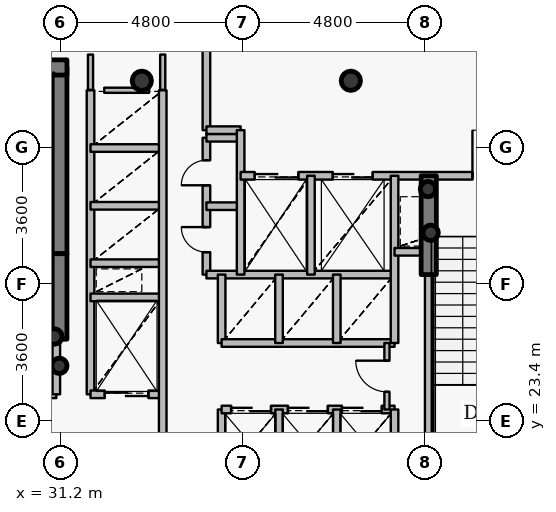
"""IFC4 building model, lengths in metres.
Left out: names, types, materials, properties, quantities, classifications, styles, units other than length and angle.
Written with IfcOpenShell. Run it as: python <this file> out.ifc"""

import sys

from ifc_helpers import new_model, si_unit, direction, frame, frame_2d, origin, origin_2d, place, context, subcontext, project, spatial, rectangle, hollow_circle, extrude, source, transform, mapped, element, fill, save


model = new_model("IFC4")
c1 = context("Model", 3, precision=1e-05, world=origin(), true_north=direction((0.0, 1.0)))
c2 = subcontext(c1, "Body", "Model", "MODEL_VIEW")
j1 = project(units=[si_unit("LENGTHUNIT", "METRE"), si_unit("PLANEANGLEUNIT", "RADIAN")], contexts=[c1])
p1 = place(None, origin())
s1 = spatial("IfcSite", under=j1, at=p1, CompositionType="ELEMENT")
p2 = place(p1, origin())
s2 = spatial("IfcBuilding", under=s1, at=p2, CompositionType="ELEMENT")
p3 = place(p2, frame((0.0, 0.0, 53.4)))
s3 = spatial("IfcBuildingStorey", under=s2, at=p3, CompositionType="ELEMENT", Elevation=53.4)
for number, where, z_axis, x_axis in (
    (1, (38.85, 32.35, 0.0), (0.0, 0.0, 1.0), (1.0, 0.0, 0.0)),
    (2, (33.35, 32.35, 0.0), (0.0, 0.0, 1.0), (1.0, 0.0, 0.0)),
):
    element("IfcColumn", number, at=place(p3, frame(where, z_axis=z_axis, x_axis=x_axis)), inside=s3, PredefinedType="COLUMN", context=c2, shape_type="SweptSolid", body=[
        extrude(hollow_circle(Radius=0.254, WallThickness=0.02, at=origin_2d()), origin(), (0.0, 0.0, 1.0), 4.2),
    ])
p4 = place(p3, frame((31.18, 27.8, 0.0), z_axis=(0.0, 0.0, 1.0), x_axis=(0.0, 1.0, 0.0)))
e3 = element("IfcWall", 3, at=p4, inside=s3, PredefinedType="SHEAR", context=c2, shape_type="SweptSolid", body=[
    extrude(rectangle(XDim=4.9, YDim=0.4, at=frame_2d((2.45, 0.0))), origin(), (0.0, 0.0, 1.0), 4.2),
])
p5 = place(p3, frame((27.28, 32.7, 0.0), z_axis=(0.0, 0.0, 1.0), x_axis=(1.0, 0.0, 0.0)))
e4 = element("IfcWall", 4, at=p5, inside=s3, PredefinedType="SHEAR", context=c2, shape_type="SweptSolid", body=[
    extrude(rectangle(XDim=4.1, YDim=0.4, at=frame_2d((2.05, 0.0))), origin(), (0.0, 0.0, 1.0), 4.2),
])
for number, where, z_axis, x_axis in (
    (5, (31.05, 25.62, 0.0), (0.0, 0.0, 1.0), (1.0, 0.0, 0.0)),
    (6, (31.18, 24.85, 0.0), (0.0, 0.0, 1.0), (1.0, 0.0, 0.0)),
    (7, (40.95, 28.35, 0.0), (0.0, 0.0, 1.0), (1.0, 0.0, 0.0)),
    (8, (40.88, 29.5, 0.0), (0.0, 0.0, 1.0), (1.0, 0.0, 0.0)),
):
    element("IfcColumn", number, at=place(p3, frame(where, z_axis=z_axis, x_axis=x_axis)), inside=s3, PredefinedType="COLUMN", context=c2, shape_type="SweptSolid", body=[
        extrude(hollow_circle(Radius=0.203, WallThickness=0.016, at=origin_2d()), origin(), (0.0, 0.0, 1.0), 4.2),
    ])
p6 = place(p3, frame((31.18, 25.55, 0.0), z_axis=(0.0, 0.0, 1.0), x_axis=(0.0, 1.0, 0.0)))
e9 = element("IfcWall", 9, at=p6, inside=s3, PredefinedType="SHEAR", context=c2, shape_type="SweptSolid", body=[
    extrude(rectangle(XDim=2.25, YDim=0.4, at=frame_2d((1.125, 0.0))), origin(), (0.0, 0.0, 1.0), 3.55),
])
p7 = place(p3, frame((40.9, 27.25, 0.0), z_axis=(0.0, 0.0, 1.0), x_axis=(0.0, 1.0, 0.0)))
e10 = element("IfcWall", 10, at=p7, inside=s3, PredefinedType="SHEAR", context=c2, shape_type="SweptSolid", body=[
    extrude(rectangle(XDim=2.6, YDim=0.4, at=frame_2d((1.3, 0.0))), origin(), (0.0, 0.0, 1.0), 3.55),
])
p8 = place(p3, frame((27.56, 24.1, 0.0), z_axis=(0.0, 0.0, 1.0), x_axis=(1.0, 0.0, 0.0)))
e11 = element("IfcWall", 11, at=p8, inside=s3, PredefinedType="PARTITIONING", context=c2, shape_type="SweptSolid", body=[
    extrude(rectangle(XDim=3.54, YDim=0.2, at=frame_2d((1.77, 0.0))), origin(), (0.0, 0.0, 1.0), 3.95),
])
p9 = place(p8, frame((1.17, 0.0, 0.0)))
e12 = element("IfcOpeningElement", 12, at=p9, cuts=e11, PredefinedType="OPENING", context=c2, shape_type="SweptSolid", body=[
    extrude(rectangle(XDim=1.2, YDim=2.15, at=origin_2d()), frame((0.6, 0.11, 1.075), z_axis=(0.0, -1.0, 0.0), x_axis=(1.0, 0.0, 0.0)), (0.0, 0.0, 1.0), 0.22),
])
p10 = place(p3, frame((31.1, 24.1, 0.0), z_axis=(0.0, 0.0, 1.0), x_axis=(0.0, 1.0, 0.0)))
e13 = element("IfcWall", 13, at=p10, inside=s3, PredefinedType="PARTITIONING", context=c2, shape_type="SweptSolid", body=[
    extrude(rectangle(XDim=1.44, YDim=0.2, at=frame_2d((0.72, 0.0))), origin(), (0.0, 0.0, 1.0), 3.95),
])
p11 = place(p3, frame((32.0, 24.1, 0.0), z_axis=(0.0, 0.0, 1.0), x_axis=(0.0, 1.0, 0.0)))
e14 = element("IfcWall", 14, at=p11, inside=s3, PredefinedType="PARTITIONING", context=c2, shape_type="SweptSolid", body=[
    extrude(rectangle(XDim=8.0, YDim=0.2, at=frame_2d((4.0, 0.0))), origin(), (0.0, 0.0, 1.0), 3.95),
])
p12 = place(p3, frame((32.0, 24.1, 0.0), z_axis=(0.0, 0.0, 1.0), x_axis=(1.0, 0.0, 0.0)))
e15 = element("IfcWall", 15, at=p12, inside=s3, PredefinedType="PARTITIONING", context=c2, shape_type="SweptSolid", body=[
    extrude(rectangle(XDim=1.9, YDim=0.2, at=frame_2d((0.95, 0.0))), origin(), (0.0, 0.0, 1.0), 3.535),
])
p13 = place(p12, frame((0.375, 0.0, 0.0)))
e16 = element("IfcOpeningElement", 16, at=p13, cuts=e15, PredefinedType="OPENING", context=c2, shape_type="SweptSolid", body=[
    extrude(rectangle(XDim=1.15, YDim=2.15, at=origin_2d()), frame((0.575, 0.11, 1.075), z_axis=(0.0, -1.0, 0.0), x_axis=(1.0, 0.0, 0.0)), (0.0, 0.0, 1.0), 0.22),
])
for number, where, z_axis, x_axis in (
    (17, (32.0, 26.65, 0.0), (0.0, 0.0, 1.0), (1.0, 0.0, 0.0)),
    (18, (32.0, 27.55, 0.0), (0.0, 0.0, 1.0), (1.0, 0.0, 0.0)),
    (19, (32.0, 29.06, 0.0), (0.0, 0.0, 1.0), (1.0, 0.0, 0.0)),
    (20, (32.0, 30.58, 0.0), (0.0, 0.0, 1.0), (1.0, 0.0, 0.0)),
):
    element("IfcWall", number, at=place(p3, frame(where, z_axis=z_axis, x_axis=x_axis)), inside=s3, PredefinedType="PARTITIONING", context=c2, shape_type="SweptSolid", body=[
        extrude(rectangle(XDim=1.9, YDim=0.2, at=frame_2d((0.95, 0.0))), origin(), (0.0, 0.0, 1.0), 3.535),
    ])
p14 = place(p3, frame((33.9, 20.7, 0.0), z_axis=(0.0, 0.0, 1.0), x_axis=(0.0, 1.0, 0.0)))
e21 = element("IfcWall", 21, at=p14, inside=s3, PredefinedType="PARTITIONING", context=c2, shape_type="SweptSolid", body=[
    extrude(rectangle(XDim=11.4, YDim=0.2, at=frame_2d((5.7, 0.0))), origin(), (0.0, 0.0, 1.0), 3.535),
])
p15 = place(p3, frame((35.05, 27.25, 0.0), z_axis=(0.0, 0.0, 1.0), x_axis=(0.0, 1.0, 0.0)))
e22 = element("IfcWall", 22, at=p15, inside=s3, PredefinedType="PARTITIONING", context=c2, shape_type="SweptSolid", body=[
    extrude(rectangle(XDim=3.6, YDim=0.2, at=frame_2d((1.8, 0.0))), origin(), (0.0, 0.0, 1.0), 3.95),
])
p16 = place(p15, frame((0.59, 0.0, 0.0)))
e23 = element("IfcOpeningElement", 23, at=p16, cuts=e22, PredefinedType="OPENING", context=c2, shape_type="SweptSolid", body=[
    extrude(rectangle(XDim=0.66, YDim=2.05, at=origin_2d()), frame((0.33, 0.11, 1.025), z_axis=(0.0, -1.0, 0.0), x_axis=(1.0, 0.0, 0.0)), (0.0, 0.0, 1.0), 0.22),
])
p17 = place(p15, frame((2.35, 0.0, 0.0)))
e24 = element("IfcOpeningElement", 24, at=p17, cuts=e22, PredefinedType="OPENING", context=c2, shape_type="SweptSolid", body=[
    extrude(rectangle(XDim=0.66, YDim=2.05, at=origin_2d()), frame((0.33, 0.11, 1.025), z_axis=(0.0, -1.0, 0.0), x_axis=(1.0, 0.0, 0.0)), (0.0, 0.0, 1.0), 0.22),
])
p18 = place(p3, frame((35.05, 27.25, 0.0), z_axis=(0.0, 0.0, 1.0), x_axis=(1.0, 0.0, 0.0)))
e25 = element("IfcWall", 25, at=p18, inside=s3, PredefinedType="PARTITIONING", context=c2, shape_type="SweptSolid", body=[
    extrude(rectangle(XDim=4.95, YDim=0.2, at=frame_2d((2.475, 0.0))), origin(), (0.0, 0.0, 1.0), 3.535),
])
for number, where, z_axis, x_axis in (
    (26, (35.05, 29.05, 0.0), (0.0, 0.0, 1.0), (1.0, 0.0, 0.0)),
    (27, (35.05, 30.85, 0.0), (0.0, 0.0, 1.0), (1.0, 0.0, 0.0)),
):
    element("IfcWall", number, at=place(p3, frame(where, z_axis=z_axis, x_axis=x_axis)), inside=s3, PredefinedType="PARTITIONING", context=c2, shape_type="SweptSolid", body=[
        extrude(rectangle(XDim=0.9, YDim=0.2, at=frame_2d((0.45, 0.0))), origin(), (0.0, 0.0, 1.0), 3.95),
    ])
p19 = place(p3, frame((35.05, 31.05, 0.0), z_axis=(0.0, 0.0, 1.0), x_axis=(0.0, 1.0, 0.0)))
e28 = element("IfcWall", 28, at=p19, inside=s3, PredefinedType="PARTITIONING", context=c2, shape_type="SweptSolid", body=[
    extrude(rectangle(XDim=2.25, YDim=0.2, at=frame_2d((1.125, 0.0))), origin(), (0.0, 0.0, 1.0), 3.535),
])
p20 = place(p3, frame((35.05, 31.05, 0.0), z_axis=(0.0, 0.0, 1.0), x_axis=(1.0, 0.0, 0.0)))
e29 = element("IfcWall", 29, at=p20, inside=s3, PredefinedType="PARTITIONING", context=c2, shape_type="SweptSolid", body=[
    extrude(rectangle(XDim=0.9, YDim=0.2, at=frame_2d((0.45, 0.0))), origin(), (0.0, 0.0, 1.0), 3.95),
])
p21 = place(p3, frame((35.45, 21.9, 0.0), z_axis=(0.0, 0.0, 1.0), x_axis=(0.0, 1.0, 0.0)))
e30 = element("IfcWall", 30, at=p21, inside=s3, PredefinedType="PARTITIONING", context=c2, shape_type="SweptSolid", body=[
    extrude(rectangle(XDim=1.8, YDim=0.2, at=frame_2d((0.9, 0.0))), origin(), (0.0, 0.0, 1.0), 3.95),
])
p22 = place(p3, frame((35.45, 23.7, 0.0), z_axis=(0.0, 0.0, 1.0), x_axis=(1.0, 0.0, 0.0)))
e31 = element("IfcWall", 31, at=p22, inside=s3, PredefinedType="PARTITIONING", context=c2, shape_type="SweptSolid", body=[
    extrude(rectangle(XDim=4.55, YDim=0.2, at=frame_2d((2.275, 0.0))), origin(), (0.0, 0.0, 1.0), 3.535),
])
p23 = place(p22, frame((0.25, 0.0, 0.0)))
e32 = element("IfcOpeningElement", 32, at=p23, cuts=e31, PredefinedType="OPENING", context=c2, shape_type="SweptSolid", body=[
    extrude(rectangle(XDim=1.05, YDim=2.15, at=origin_2d()), frame((0.525, 0.11, 1.075), z_axis=(0.0, -1.0, 0.0), x_axis=(1.0, 0.0, 0.0)), (0.0, 0.0, 1.0), 0.22),
])
p24 = place(p22, frame((1.745, 0.0, 0.0)))
e33 = element("IfcOpeningElement", 33, at=p24, cuts=e31, PredefinedType="OPENING", context=c2, shape_type="SweptSolid", body=[
    extrude(rectangle(XDim=1.05, YDim=2.15, at=origin_2d()), frame((0.525, 0.11, 1.075), z_axis=(0.0, -1.0, 0.0), x_axis=(1.0, 0.0, 0.0)), (0.0, 0.0, 1.0), 0.22),
])
p25 = place(p22, frame((3.165, 0.0, 0.0)))
e34 = element("IfcOpeningElement", 34, at=p25, cuts=e31, PredefinedType="OPENING", context=c2, shape_type="SweptSolid", body=[
    extrude(rectangle(XDim=1.05, YDim=2.15, at=origin_2d()), frame((0.525, 0.11, 1.075), z_axis=(0.0, -1.0, 0.0), x_axis=(1.0, 0.0, 0.0)), (0.0, 0.0, 1.0), 0.22),
])
p26 = place(p3, frame((35.45, 25.45, 0.0), z_axis=(0.0, 0.0, 1.0), x_axis=(0.0, 1.0, 0.0)))
e35 = element("IfcWall", 35, at=p26, inside=s3, PredefinedType="PARTITIONING", context=c2, shape_type="SweptSolid", body=[
    extrude(rectangle(XDim=1.8, YDim=0.2, at=frame_2d((0.9, 0.0))), origin(), (0.0, 0.0, 1.0), 3.95),
])
p27 = place(p3, frame((35.45, 25.45, 0.0), z_axis=(0.0, 0.0, 1.0), x_axis=(1.0, 0.0, 0.0)))
e36 = element("IfcWall", 36, at=p27, inside=s3, PredefinedType="PARTITIONING", context=c2, shape_type="SweptSolid", body=[
    extrude(rectangle(XDim=4.55, YDim=0.2, at=frame_2d((2.275, 0.0))), origin(), (0.0, 0.0, 1.0), 3.535),
])
p28 = place(p3, frame((35.95, 27.25, 0.0), z_axis=(0.0, 0.0, 1.0), x_axis=(0.0, 1.0, 0.0)))
e37 = element("IfcWall", 37, at=p28, inside=s3, PredefinedType="PARTITIONING", context=c2, shape_type="SweptSolid", body=[
    extrude(rectangle(XDim=3.8, YDim=0.2, at=frame_2d((1.9, 0.0))), origin(), (0.0, 0.0, 1.0), 3.95),
])
p29 = place(p3, frame((35.95, 29.85, 0.0), z_axis=(0.0, 0.0, 1.0), x_axis=(1.0, 0.0, 0.0)))
e38 = element("IfcWall", 38, at=p29, inside=s3, PredefinedType="PARTITIONING", context=c2, shape_type="SweptSolid", body=[
    extrude(rectangle(XDim=8.49, YDim=0.2, at=frame_2d((4.245, 0.0))), origin(), (0.0, 0.0, 1.0), 3.535),
])
p30 = place(p29, frame((6.1, 0.0, 0.0)))
e39 = element("IfcOpeningElement", 39, at=p30, cuts=e38, PredefinedType="OPENING", context=c2, shape_type="SweptSolid", body=[
    extrude(rectangle(XDim=1.2, YDim=2.15, at=origin_2d()), frame((0.6, 0.11, 1.075), z_axis=(0.0, -1.0, 0.0), x_axis=(1.0, 0.0, 0.0)), (0.0, 0.0, 1.0), 0.22),
])
p31 = place(p29, frame((0.37, 0.0, 0.0)))
e40 = element("IfcOpeningElement", 40, at=p31, cuts=e38, PredefinedType="OPENING", context=c2, shape_type="SweptSolid", body=[
    extrude(rectangle(XDim=1.15, YDim=2.15, at=origin_2d()), frame((0.575, 0.11, 1.075), z_axis=(0.0, -1.0, 0.0), x_axis=(1.0, 0.0, 0.0)), (0.0, 0.0, 1.0), 0.22),
])
p32 = place(p29, frame((2.425, 0.0, 0.0)))
e41 = element("IfcOpeningElement", 41, at=p32, cuts=e38, PredefinedType="OPENING", context=c2, shape_type="SweptSolid", body=[
    extrude(rectangle(XDim=1.05, YDim=2.15, at=origin_2d()), frame((0.525, 0.11, 1.075), z_axis=(0.0, -1.0, 0.0), x_axis=(1.0, 0.0, 0.0)), (0.0, 0.0, 1.0), 0.22),
])
for number, where, z_axis, x_axis in (
    (42, (36.96, 21.9, 0.0), (0.0, 0.0, 1.0), (0.0, 1.0, 0.0)),
    (43, (36.96, 25.45, 0.0), (0.0, 0.0, 1.0), (0.0, 1.0, 0.0)),
):
    element("IfcWall", number, at=place(p3, frame(where, z_axis=z_axis, x_axis=x_axis)), inside=s3, PredefinedType="PARTITIONING", context=c2, shape_type="SweptSolid", body=[
        extrude(rectangle(XDim=1.8, YDim=0.2, at=frame_2d((0.9, 0.0))), origin(), (0.0, 0.0, 1.0), 3.95),
    ])
p33 = place(p3, frame((37.8, 27.25, 0.0), z_axis=(0.0, 0.0, 1.0), x_axis=(0.0, 1.0, 0.0)))
e44 = element("IfcWall", 44, at=p33, inside=s3, PredefinedType="PARTITIONING", context=c2, shape_type="SweptSolid", body=[
    extrude(rectangle(XDim=2.6, YDim=0.2, at=frame_2d((1.3, 0.0))), origin(), (0.0, 0.0, 1.0), 3.95),
])
for number, where, z_axis, x_axis in (
    (45, (38.48, 21.9, 0.0), (0.0, 0.0, 1.0), (0.0, 1.0, 0.0)),
    (46, (38.48, 25.45, 0.0), (0.0, 0.0, 1.0), (0.0, 1.0, 0.0)),
):
    element("IfcWall", number, at=place(p3, frame(where, z_axis=z_axis, x_axis=x_axis)), inside=s3, PredefinedType="PARTITIONING", context=c2, shape_type="SweptSolid", body=[
        extrude(rectangle(XDim=1.8, YDim=0.2, at=frame_2d((0.9, 0.0))), origin(), (0.0, 0.0, 1.0), 3.95),
    ])
p34 = place(p3, frame((39.8, 23.7, 0.0), z_axis=(0.0, 0.0, 1.0), x_axis=(0.0, 1.0, 0.0)))
e47 = element("IfcWall", 47, at=p34, inside=s3, PredefinedType="PARTITIONING", context=c2, shape_type="SweptSolid", body=[
    extrude(rectangle(XDim=1.75, YDim=0.135, at=frame_2d((0.875, 0.0))), origin(), (0.0, 0.0, 1.0), 3.95),
])
p35 = place(p34, frame((0.465, 0.0, 0.0)))
e48 = element("IfcOpeningElement", 48, at=p35, cuts=e47, PredefinedType="OPENING", context=c2, shape_type="SweptSolid", body=[
    extrude(rectangle(XDim=0.82, YDim=2.1, at=origin_2d()), frame((0.41, 0.078, 1.05), z_axis=(0.0, -1.0, 0.0), x_axis=(1.0, 0.0, 0.0)), (0.0, 0.0, 1.0), 0.155),
])
p36 = place(p3, frame((40.0, 21.9, 0.0), z_axis=(0.0, 0.0, 1.0), x_axis=(0.0, 1.0, 0.0)))
e49 = element("IfcWall", 49, at=p36, inside=s3, PredefinedType="PARTITIONING", context=c2, shape_type="SweptSolid", body=[
    extrude(rectangle(XDim=1.8, YDim=0.2, at=frame_2d((0.9, 0.0))), origin(), (0.0, 0.0, 1.0), 3.95),
])
p37 = place(p3, frame((40.0, 25.45, 0.0), z_axis=(0.0, 0.0, 1.0), x_axis=(0.0, 1.0, 0.0)))
e50 = element("IfcWall", 50, at=p37, inside=s3, PredefinedType="PARTITIONING", context=c2, shape_type="SweptSolid", body=[
    extrude(rectangle(XDim=4.4, YDim=0.2, at=frame_2d((2.2, 0.0))), origin(), (0.0, 0.0, 1.0), 3.95),
])
p38 = place(p3, frame((40.0, 27.85, 0.0), z_axis=(0.0, 0.0, 1.0), x_axis=(1.0, 0.0, 0.0)))
e51 = element("IfcWall", 51, at=p38, inside=s3, PredefinedType="PARTITIONING", context=c2, shape_type="SweptSolid", body=[
    extrude(rectangle(XDim=0.9, YDim=0.2, at=frame_2d((0.45, 0.0))), origin(), (0.0, 0.0, 1.0), 3.95),
])
p39 = place(p3, frame((40.9, 21.33, 0.0), z_axis=(0.0, 0.0, 1.0), x_axis=(0.0, 1.0, 0.0)))
e52 = element("IfcWall", 52, at=p39, inside=s3, PredefinedType="PARTITIONING", context=c2, shape_type="SweptSolid", body=[
    extrude(rectangle(XDim=5.91, YDim=0.2, at=frame_2d((2.955, 0.0))), origin(), (0.0, 0.0, 1.0), 3.485),
])
p40 = place(p3, frame((32.36, 32.1, 0.0), z_axis=(0.0, 0.0, 1.0), x_axis=(1.0, 0.0, 0.0)))
e53 = element("IfcWall", 53, at=p40, inside=s3, PredefinedType="PARTITIONING", context=c2, shape_type="SweptSolid", body=[
    extrude(rectangle(XDim=1.18, YDim=0.135, at=frame_2d((0.59, 0.0))), origin(), (0.0, 0.0, 1.0), 3.535),
])
p41 = place(p3, frame((32.0, 33.04, 0.0), z_axis=(0.0, 0.0, 1.0), x_axis=(0.0, -1.0, 0.0)))
e54 = element("IfcWall", 54, at=p41, inside=s3, PredefinedType="PARTITIONING", context=c2, shape_type="SweptSolid", body=[
    extrude(rectangle(XDim=0.93, YDim=0.135, at=frame_2d((0.465, 0.0))), origin(), (0.0, 0.0, 1.0), 3.485),
])
p42 = place(p3, frame((33.9, 32.11, 0.0), z_axis=(0.0, 0.0, 1.0), x_axis=(0.0, 1.0, 0.0)))
e55 = element("IfcWall", 55, at=p42, inside=s3, PredefinedType="PARTITIONING", context=c2, shape_type="SweptSolid", body=[
    extrude(rectangle(XDim=0.93, YDim=0.135, at=frame_2d((0.465, 0.0))), origin(), (0.0, 0.0, 1.0), 3.535),
])
m1 = source(origin(), c2, "Body", "SweptSolid", [
    extrude(rectangle(XDim=1.2, YDim=2.15, at=origin_2d()), frame((0.6, 0.025, 1.075), z_axis=(0.0, -1.0, 0.0), x_axis=(1.0, 0.0, 0.0)), (0.0, 0.0, 1.0), 0.05),
])
p43 = place(p30, origin())
e56 = element("IfcDoor", 56, at=p43, inside=s3, OperationType="SINGLE_SWING_LEFT", PredefinedType="DOOR", context=c2, shape_type="MappedRepresentation", body=[
    mapped(m1, transform((0.0, 0.0, 0.0), x_axis=(1.0, 0.0, 0.0), y_axis=(0.0, 1.0, 0.0), z_axis=(0.0, 0.0, 1.0), scale=1.0)),
])
fill(e39, e56)
m2 = source(origin(), c2, "Body", "SweptSolid", [
    extrude(rectangle(XDim=1.15, YDim=2.15, at=origin_2d()), frame((0.575, 0.025, 1.075), z_axis=(0.0, -1.0, 0.0), x_axis=(1.0, 0.0, 0.0)), (0.0, 0.0, 1.0), 0.05),
])
p44 = place(p31, origin())
e57 = element("IfcDoor", 57, at=p44, inside=s3, OperationType="DOUBLE_DOOR_SLIDING", PredefinedType="USERDEFINED", context=c2, shape_type="MappedRepresentation", body=[
    mapped(m2, transform((0.0, 0.0, 0.0), x_axis=(1.0, 0.0, 0.0), y_axis=(0.0, 1.0, 0.0), z_axis=(0.0, 0.0, 1.0), scale=1.0)),
])
fill(e40, e57)
p45 = place(p13, origin())
e58 = element("IfcDoor", 58, at=p45, inside=s3, OperationType="DOUBLE_DOOR_SLIDING", PredefinedType="USERDEFINED", context=c2, shape_type="MappedRepresentation", body=[
    mapped(m2, transform((0.0, 0.0, 0.0), x_axis=(1.0, 0.0, 0.0), y_axis=(0.0, 1.0, 0.0), z_axis=(0.0, 0.0, 1.0), scale=1.0)),
])
fill(e16, e58)
m3 = source(origin(), c2, "Body", "SweptSolid", [
    extrude(rectangle(XDim=1.05, YDim=2.15, at=origin_2d()), frame((0.525, 0.025, 1.075), z_axis=(0.0, -1.0, 0.0), x_axis=(1.0, 0.0, 0.0)), (0.0, 0.0, 1.0), 0.05),
])
p46 = place(p32, origin())
e59 = element("IfcDoor", 59, at=p46, inside=s3, OperationType="DOUBLE_DOOR_SLIDING", PredefinedType="USERDEFINED", context=c2, shape_type="MappedRepresentation", body=[
    mapped(m3, transform((0.0, 0.0, 0.0), x_axis=(1.0, 0.0, 0.0), y_axis=(0.0, 1.0, 0.0), z_axis=(0.0, 0.0, 1.0), scale=1.0)),
])
fill(e41, e59)
p47 = place(p23, origin())
e60 = element("IfcDoor", 60, at=p47, inside=s3, OperationType="DOUBLE_DOOR_SLIDING", PredefinedType="USERDEFINED", context=c2, shape_type="MappedRepresentation", body=[
    mapped(m3, transform((0.0, 0.0, 0.0), x_axis=(1.0, 0.0, 0.0), y_axis=(0.0, 1.0, 0.0), z_axis=(0.0, 0.0, 1.0), scale=1.0)),
])
fill(e32, e60)
p48 = place(p24, origin())
e61 = element("IfcDoor", 61, at=p48, inside=s3, OperationType="DOUBLE_DOOR_SLIDING", PredefinedType="USERDEFINED", context=c2, shape_type="MappedRepresentation", body=[
    mapped(m3, transform((0.0, 0.0, 0.0), x_axis=(1.0, 0.0, 0.0), y_axis=(0.0, 1.0, 0.0), z_axis=(0.0, 0.0, 1.0), scale=1.0)),
])
fill(e33, e61)
p49 = place(p25, origin())
e62 = element("IfcDoor", 62, at=p49, inside=s3, OperationType="DOUBLE_DOOR_SLIDING", PredefinedType="USERDEFINED", context=c2, shape_type="MappedRepresentation", body=[
    mapped(m3, transform((0.0, 0.0, 0.0), x_axis=(1.0, 0.0, 0.0), y_axis=(0.0, 1.0, 0.0), z_axis=(0.0, 0.0, 1.0), scale=1.0)),
])
fill(e34, e62)
m4 = source(origin(), c2, "Body", "SweptSolid", [
    extrude(rectangle(XDim=0.66, YDim=2.05, at=origin_2d()), frame((0.33, 0.025, 1.025), z_axis=(0.0, -1.0, 0.0), x_axis=(1.0, 0.0, 0.0)), (0.0, 0.0, 1.0), 0.05),
])
p50 = place(p16, origin())
e63 = element("IfcDoor", 63, at=p50, inside=s3, OperationType="SINGLE_SWING_RIGHT", PredefinedType="USERDEFINED", context=c2, shape_type="MappedRepresentation", body=[
    mapped(m4, transform((0.0, 0.0, 0.0), x_axis=(1.0, 0.0, 0.0), y_axis=(0.0, 1.0, 0.0), z_axis=(0.0, 0.0, 1.0), scale=1.0)),
])
fill(e23, e63)
p51 = place(p17, origin())
e64 = element("IfcDoor", 64, at=p51, inside=s3, OperationType="SINGLE_SWING_LEFT", PredefinedType="USERDEFINED", context=c2, shape_type="MappedRepresentation", body=[
    mapped(m4, transform((0.0, 0.0, 0.0), x_axis=(1.0, 0.0, 0.0), y_axis=(0.0, 1.0, 0.0), z_axis=(0.0, 0.0, 1.0), scale=1.0)),
])
fill(e24, e64)
m5 = source(origin(), c2, "Body", "SweptSolid", [
    extrude(rectangle(XDim=0.82, YDim=2.1, at=origin_2d()), frame((0.41, 0.025, 1.05), z_axis=(0.0, -1.0, 0.0), x_axis=(1.0, 0.0, 0.0)), (0.0, 0.0, 1.0), 0.05),
])
p52 = place(p35, origin())
e65 = element("IfcDoor", 65, at=p52, inside=s3, OperationType="SINGLE_SWING_RIGHT", PredefinedType="DOOR", context=c2, shape_type="MappedRepresentation", body=[
    mapped(m5, transform((0.0, 0.0, 0.0), x_axis=(1.0, 0.0, 0.0), y_axis=(0.0, 1.0, 0.0), z_axis=(0.0, 0.0, 1.0), scale=1.0)),
])
fill(e48, e65)
save(model, sys.argv[1])
